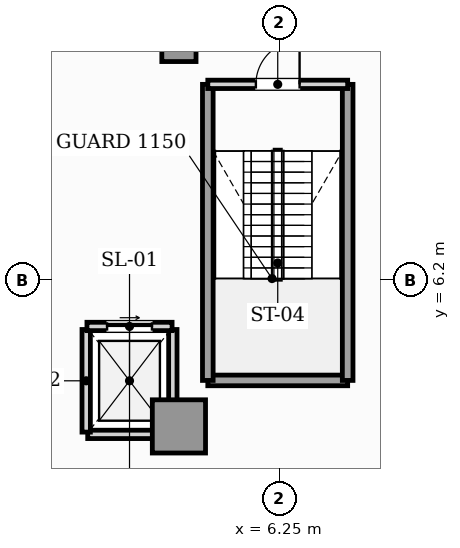
"""IFC4 building model, lengths in metres.
Left out: names, types, materials, properties, quantities, classifications, styles, units other than length and angle.
Written with IfcOpenShell. Run it as: python <this file> out.ifc"""

import sys

from ifc_helpers import new_model, si_unit, direction, frame, frame_2d, origin, origin_2d, place, context, subcontext, project, spatial, rectangle, hollow_rectangle, extrude, element, fill, save


model = new_model("IFC4")
c1 = context("Model", 3, precision=1e-05, world=origin(), true_north=direction((0.0, 1.0)))
c2 = subcontext(c1, "Body", "Model", "MODEL_VIEW")
j1 = project(units=[si_unit("LENGTHUNIT", "METRE"), si_unit("PLANEANGLEUNIT", "RADIAN")], contexts=[c1])
p1 = place(None, origin())
s1 = spatial("IfcSite", under=j1, at=p1, CompositionType="ELEMENT")
p2 = place(p1, origin())
s2 = spatial("IfcBuilding", under=s1, at=p2, CompositionType="ELEMENT")
p3 = place(p2, frame((0.0, 0.0, 15.0)))
s3 = spatial("IfcBuildingStorey", under=s2, at=p3, CompositionType="ELEMENT", Elevation=15.0)
p4 = place(p3, frame((3.6, 2.35, 0.0), z_axis=(0.0, 0.0, 1.0), x_axis=(1.0, 0.0, 0.0)))
e1 = element("IfcColumn", 1, at=p4, inside=s3, PredefinedType="USERDEFINED", context=c2, shape_type="SweptSolid", body=[
    extrude(hollow_rectangle(XDim=1.4, YDim=1.4, WallThickness=0.08, at=origin_2d()), origin(), (0.0, 0.0, 1.0), 4.8),
])
p5 = place(p3, frame((3.6, 12.4, 0.0), z_axis=(0.0, 0.0, 1.0), x_axis=(1.0, 0.0, 0.0)))
e2 = element("IfcColumn", 2, at=p5, inside=s3, PredefinedType="COLUMN", context=c2, shape_type="SweptSolid", body=[
    extrude(rectangle(XDim=0.9, YDim=0.9, at=origin_2d()), origin(), (0.0, 0.0, 1.0), 4.8),
])
p6 = place(p3, frame((1.2, 2.14, 0.0), z_axis=(0.0, 0.0, 1.0), x_axis=(1.0, 0.0, 0.0)))
e3 = element("IfcWall", 3, at=p6, inside=s3, PredefinedType="SOLIDWALL", context=c2, shape_type="SweptSolid", body=[
    extrude(rectangle(XDim=2.2, YDim=0.22, at=frame_2d((1.1, 0.0))), origin(), (0.0, 0.0, 1.0), 4.5),
])
p7 = place(p3, frame((1.16, 2.2, 0.0), z_axis=(0.0, 0.0, 1.0), x_axis=(0.0, 1.0, 0.0)))
e4 = element("IfcWall", 4, at=p7, inside=s3, PredefinedType="SOLIDWALL", context=c2, shape_type="SweptSolid", body=[
    extrude(rectangle(XDim=2.7, YDim=0.22, at=frame_2d((1.35, 0.0))), origin(), (0.0, 0.0, 1.0), 4.5),
])
p8 = place(p3, frame((3.44, 2.2, 0.0), z_axis=(0.0, 0.0, 1.0), x_axis=(0.0, 1.0, 0.0)))
e5 = element("IfcWall", 5, at=p8, inside=s3, PredefinedType="SOLIDWALL", context=c2, shape_type="SweptSolid", body=[
    extrude(rectangle(XDim=2.7, YDim=0.22, at=frame_2d((1.35, 0.0))), origin(), (0.0, 0.0, 1.0), 3.967),
])
p9 = place(p3, frame((1.18, 4.98, 0.0), z_axis=(0.0, 0.0, 1.0), x_axis=(1.0, 0.0, 0.0)))
e6 = element("IfcWall", 6, at=p9, inside=s3, PredefinedType="SOLIDWALL", context=c2, shape_type="SweptSolid", body=[
    extrude(rectangle(XDim=2.24, YDim=0.22, at=frame_2d((1.12, 0.0))), origin(), (0.0, 0.0, 1.0), 4.5),
])
p10 = place(p9, frame((0.53, 0.0, 0.0)))
e7 = element("IfcOpeningElement", 7, at=p10, cuts=e6, PredefinedType="OPENING", context=c2, shape_type="SweptSolid", body=[
    extrude(rectangle(XDim=1.18, YDim=2.2, at=frame_2d((0.59, 1.1))), frame((0.0, 0.12, 0.0), z_axis=(0.0, -1.0, 0.0), x_axis=(1.0, 0.0, 0.0)), (0.0, 0.0, 1.0), 0.24),
])
p11 = place(p3, frame((4.36, 3.56, 0.0), z_axis=(0.0, 0.0, 1.0), x_axis=(1.0, 0.0, 0.0)))
e8 = element("IfcWall", 8, at=p11, inside=s3, PredefinedType="SHEAR", context=c2, shape_type="SweptSolid", body=[
    extrude(rectangle(XDim=3.68, YDim=0.28, at=frame_2d((1.84, 0.0))), origin(), (0.0, 0.0, 1.0), 4.5),
])
for number, where, z_axis, x_axis in (
    (9, (4.36, 3.56, 0.0), (0.0, 0.0, 1.0), (0.0, 1.0, 0.0)),
    (10, (8.04, 3.56, 0.0), (0.0, 0.0, 1.0), (0.0, 1.0, 0.0)),
):
    element("IfcWall", number, at=place(p3, frame(where, z_axis=z_axis, x_axis=x_axis)), inside=s3, PredefinedType="SHEAR", context=c2, shape_type="SweptSolid", body=[
        extrude(rectangle(XDim=7.79, YDim=0.28, at=frame_2d((3.895, 0.0))), origin(), (0.0, 0.0, 1.0), 4.5),
    ])
p12 = place(p3, frame((4.36, 11.35, 0.0), z_axis=(0.0, 0.0, 1.0), x_axis=(1.0, 0.0, 0.0)))
e11 = element("IfcWall", 11, at=p12, inside=s3, PredefinedType="SOLIDWALL", context=c2, shape_type="SweptSolid", body=[
    extrude(rectangle(XDim=3.68, YDim=0.22, at=frame_2d((1.84, 0.0))), origin(), (0.0, 0.0, 1.0), 4.5),
])
p13 = place(p12, frame((1.265, 0.0, 0.0)))
e12 = element("IfcOpeningElement", 12, at=p13, cuts=e11, PredefinedType="OPENING", context=c2, shape_type="SweptSolid", body=[
    extrude(rectangle(XDim=1.15, YDim=2.2, at=frame_2d((0.575, 1.1))), frame((0.0, 0.12, 0.0), z_axis=(0.0, -1.0, 0.0), x_axis=(1.0, 0.0, 0.0)), (0.0, 0.0, 1.0), 0.24),
])
p14 = place(p10, origin())
e13 = element("IfcDoor", 13, at=p14, inside=s3, OperationType="SLIDING_TO_RIGHT", PredefinedType="DOOR", context=c2, shape_type="SweptSolid", body=[
    extrude(rectangle(XDim=1.18, YDim=2.2, at=frame_2d((0.59, 1.1))), frame((0.0, 0.025, 0.0), z_axis=(0.0, -1.0, 0.0), x_axis=(1.0, 0.0, 0.0)), (0.0, 0.0, 1.0), 0.05),
])
fill(e7, e13)
p15 = place(p13, origin())
e14 = element("IfcDoor", 14, at=p15, inside=s3, OperationType="SINGLE_SWING_RIGHT", PredefinedType="DOOR", context=c2, shape_type="SweptSolid", body=[
    extrude(rectangle(XDim=1.15, YDim=2.2, at=frame_2d((0.575, 1.1))), frame((0.0, 0.025, 0.0), z_axis=(0.0, -1.0, 0.0), x_axis=(1.0, 0.0, 0.0)), (0.0, 0.0, 1.0), 0.05),
])
fill(e12, e14)
save(model, sys.argv[1])
